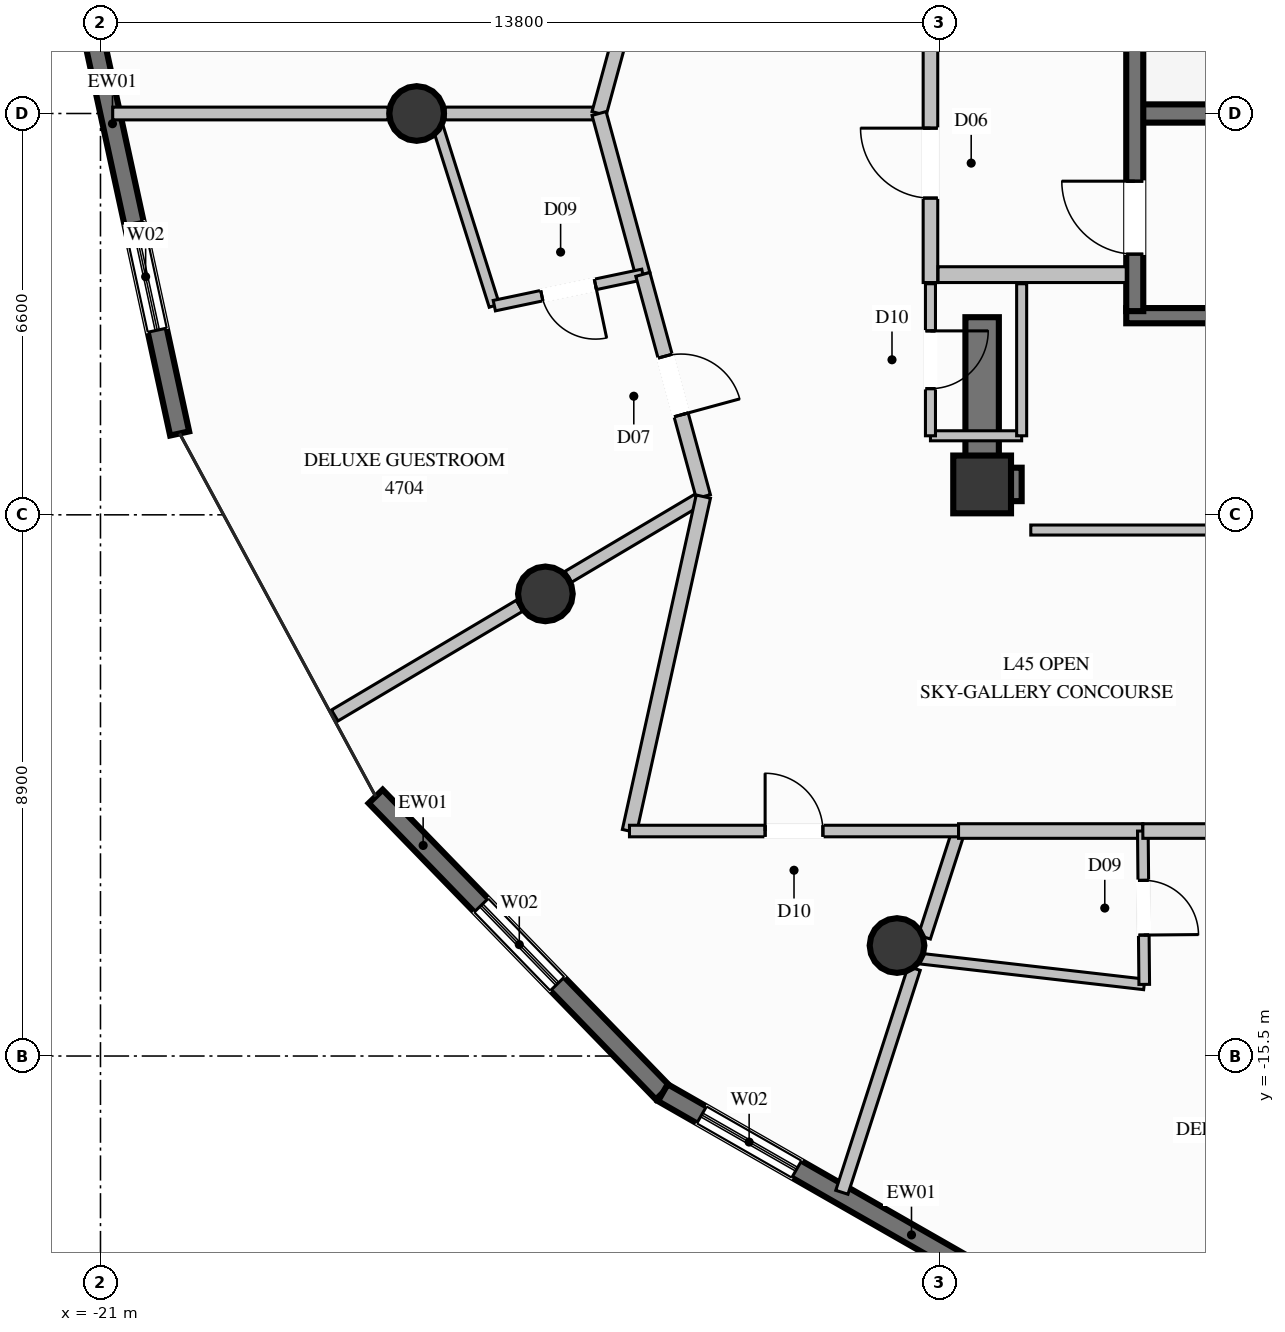
"""IFC4 building model, lengths in metres.
Left out: names, types, materials, properties, quantities, classifications, styles, units other than length and angle.
Written with IfcOpenShell. Run it as: python <this file> out.ifc"""

import sys

from ifc_helpers import new_model, si_unit, direction, frame, frame_2d, origin, origin_2d, place, context, subcontext, project, spatial, rectangle, circle, extrude, element, fill, save


model = new_model("IFC4")
c1 = context("Model", 3, precision=1e-05, world=origin(), true_north=direction((0.0, 1.0)))
c2 = subcontext(c1, "Body", "Model", "MODEL_VIEW")
j1 = project(units=[si_unit("LENGTHUNIT", "METRE"), si_unit("PLANEANGLEUNIT", "RADIAN")], contexts=[c1])
p1 = place(None, origin())
s1 = spatial("IfcSite", under=j1, at=p1, CompositionType="ELEMENT")
p2 = place(p1, origin())
s2 = spatial("IfcBuilding", under=s1, at=p2, CompositionType="ELEMENT")
p3 = place(p2, frame((0.0, 0.0, 176.8)))
s3 = spatial("IfcBuildingStorey", under=s2, at=p3, CompositionType="ELEMENT", Elevation=176.8)
p4 = place(p3, frame((-6.5, -6.1, 0.0), z_axis=(0.0, 0.0, 1.0), x_axis=(1.0, 0.0, 0.0)))
e1 = element("IfcColumn", 1, at=p4, inside=s3, PredefinedType="COLUMN", context=c2, shape_type="SweptSolid", body=[
    extrude(rectangle(XDim=0.95, YDim=0.95, at=origin_2d()), origin(), (0.0, 0.0, 1.0), 3.6),
])
p5 = place(p3, frame((-3.99, 0.0, 0.0), z_axis=(0.0, 0.0, 1.0), x_axis=(1.0, 0.0, 0.0)))
e2 = element("IfcWall", 2, at=p5, inside=s3, PredefinedType="SHEAR", context=c2, shape_type="SweptSolid", body=[
    extrude(rectangle(XDim=7.98, YDim=0.3, at=frame_2d((3.99, 0.0))), origin(), (0.0, 0.0, 1.0), 3.6),
])
p6 = place(p3, frame((-4.13, -3.325, 0.0), z_axis=(0.0, 0.0, 1.0), x_axis=(1.0, 0.0, 0.0)))
e3 = element("IfcWall", 3, at=p6, inside=s3, PredefinedType="SOLIDWALL", context=c2, shape_type="SweptSolid", body=[
    extrude(rectangle(XDim=8.26, YDim=0.25, at=frame_2d((4.13, 0.0))), origin(), (0.0, 0.0, 1.0), 3.6),
])
p7 = place(p3, frame((-6.225, -6.1, 0.0), z_axis=(0.0, 0.0, 1.0), x_axis=(1.0, 0.0, 0.0)))
e4 = element("IfcWall", 4, at=p7, inside=s3, PredefinedType="SHEAR", context=c2, shape_type="SweptSolid", body=[
    extrude(rectangle(XDim=0.375, YDim=0.55, at=frame_2d((0.188, 0.0))), origin(), (0.0, 0.0, 1.0), 3.6),
])
p8 = place(p3, frame((-6.5, -6.375, 0.0), z_axis=(0.0, 0.0, 1.0), x_axis=(0.0, 1.0, 0.0)))
e5 = element("IfcWall", 5, at=p8, inside=s3, PredefinedType="SHEAR", context=c2, shape_type="SweptSolid", body=[
    extrude(rectangle(XDim=3.025, YDim=0.55, at=frame_2d((1.512, 0.0))), origin(), (0.0, 0.0, 1.0), 3.6),
])
for number, where, z_axis, x_axis in (
    (6, (-15.8, 0.0, 0.0), (0.0, 0.0, 1.0), (1.0, 0.0, 0.0)),
    (7, (-13.683, -7.9, 0.0), (0.0, 0.0, 1.0), (1.0, 0.0, 0.0)),
    (8, (-7.9, -13.683, 0.0), (0.0, 0.0, 1.0), (1.0, 0.0, 0.0)),
):
    element("IfcColumn", number, at=place(p3, frame(where, z_axis=z_axis, x_axis=x_axis)), inside=s3, PredefinedType="COLUMN", context=c2, shape_type="SweptSolid", body=[
        extrude(circle(Radius=0.45, at=origin_2d()), origin(), (0.0, 0.0, 1.0), 3.6),
    ])
p9 = place(p3, frame((-19.698, -5.262, 0.0), z_axis=(0.0, 0.0, 1.0), x_axis=(-0.211992849193, 0.977271217161, 0.0)))
e9 = element("IfcWall", 9, at=p9, inside=s3, PredefinedType="SOLIDWALL", context=c2, shape_type="SweptSolid", body=[
    extrude(rectangle(XDim=6.637, YDim=0.32, at=frame_2d((3.318, 0.0))), origin(), (0.0, 0.0, 1.0), 3.36),
])
p10 = place(p9, frame((1.738, 0.0, 0.35)))
e10 = element("IfcOpeningElement", 10, at=p10, cuts=e9, PredefinedType="OPENING", context=c2, shape_type="SweptSolid", body=[
    extrude(rectangle(XDim=1.8, YDim=2.6, at=frame_2d((0.9, 1.3))), frame((0.0, 0.17, 0.0), z_axis=(0.0, -1.0, 0.0), x_axis=(1.0, 0.0, 0.0)), (0.0, 0.0, 1.0), 0.34),
])
p11 = place(p3, frame((-11.751, -16.103, 0.0), z_axis=(0.0, 0.0, 1.0), x_axis=(-0.696119985346, 0.71792545992, 0.0)))
e11 = element("IfcWall", 11, at=p11, inside=s3, PredefinedType="SOLIDWALL", context=c2, shape_type="SweptSolid", body=[
    extrude(rectangle(XDim=6.785, YDim=0.32, at=frame_2d((3.393, 0.0))), origin(), (0.0, 0.0, 1.0), 3.36),
])
p12 = place(p11, frame((2.492, 0.0, 0.35)))
e12 = element("IfcOpeningElement", 12, at=p12, cuts=e11, PredefinedType="OPENING", context=c2, shape_type="SweptSolid", body=[
    extrude(rectangle(XDim=1.8, YDim=2.6, at=frame_2d((0.9, 1.3))), frame((0.0, 0.17, 0.0), z_axis=(0.0, -1.0, 0.0), x_axis=(1.0, 0.0, 0.0)), (0.0, 0.0, 1.0), 0.34),
])
p13 = place(p3, frame((-5.99, -19.398, 0.0), z_axis=(0.0, 0.0, 1.0), x_axis=(-0.868052920032, 0.496471678974, 0.0)))
e13 = element("IfcWall", 13, at=p13, inside=s3, PredefinedType="SOLIDWALL", context=c2, shape_type="SweptSolid", body=[
    extrude(rectangle(XDim=6.637, YDim=0.32, at=frame_2d((3.318, 0.0))), origin(), (0.0, 0.0, 1.0), 3.36),
])
p14 = place(p13, frame((4.102, 0.0, 0.35)))
e14 = element("IfcOpeningElement", 14, at=p14, cuts=e13, PredefinedType="OPENING", context=c2, shape_type="SweptSolid", body=[
    extrude(rectangle(XDim=1.8, YDim=2.6, at=frame_2d((0.9, 1.3))), frame((0.0, 0.17, 0.0), z_axis=(0.0, -1.0, 0.0), x_axis=(1.0, 0.0, 0.0)), (0.0, 0.0, 1.0), 0.34),
])
p15 = place(p3, frame((-3.99, -3.25, 0.0), z_axis=(0.0, 0.0, 1.0), x_axis=(0.0, 1.0, 0.0)))
e15 = element("IfcWall", 15, at=p15, inside=s3, PredefinedType="SOLIDWALL", context=c2, shape_type="SweptSolid", body=[
    extrude(rectangle(XDim=5.46, YDim=0.28, at=frame_2d((2.73, 0.0))), origin(), (0.0, 0.0, 1.0), 3.36),
])
p16 = place(p15, frame((0.937, 0.0, 0.0)))
e16 = element("IfcOpeningElement", 16, at=p16, cuts=e15, PredefinedType="OPENING", context=c2, shape_type="SweptSolid", body=[
    extrude(rectangle(XDim=1.2, YDim=2.2, at=frame_2d((0.6, 1.1))), frame((0.0, 0.15, 0.0), z_axis=(0.0, -1.0, 0.0), x_axis=(1.0, 0.0, 0.0)), (0.0, 0.0, 1.0), 0.3),
])
p17 = place(p3, frame((-7.35, -2.78, 0.0), z_axis=(0.0, 0.0, 1.0), x_axis=(0.0, 1.0, 0.0)))
e17 = element("IfcWall", 17, at=p17, inside=s3, PredefinedType="PARTITIONING", context=c2, shape_type="SweptSolid", body=[
    extrude(rectangle(XDim=5.12, YDim=0.24, at=frame_2d((2.56, 0.0))), origin(), (0.0, 0.0, 1.0), 2.445),
])
p18 = place(p17, frame((1.389, 0.0, 0.0)))
e18 = element("IfcOpeningElement", 18, at=p18, cuts=e17, PredefinedType="OPENING", context=c2, shape_type="SweptSolid", body=[
    extrude(rectangle(XDim=1.15, YDim=2.2, at=frame_2d((0.575, 1.1))), frame((0.0, 0.13, 0.0), z_axis=(0.0, -1.0, 0.0), x_axis=(1.0, 0.0, 0.0)), (0.0, 0.0, 1.0), 0.26),
])
p19 = place(p3, frame((-7.225, -2.65, 0.0), z_axis=(0.0, 0.0, 1.0), x_axis=(1.0, 0.0, 0.0)))
e19 = element("IfcWall", 19, at=p19, inside=s3, PredefinedType="PARTITIONING", context=c2, shape_type="SweptSolid", body=[
    extrude(rectangle(XDim=3.095, YDim=0.26, at=frame_2d((1.548, 0.0))), origin(), (0.0, 0.0, 1.0), 3.36),
])
p20 = place(p3, frame((-7.35, -5.3, 0.0), z_axis=(0.0, 0.0, 1.0), x_axis=(1.0, 0.0, 0.0)))
e20 = element("IfcWall", 20, at=p20, inside=s3, PredefinedType="PARTITIONING", context=c2, shape_type="SweptSolid", body=[
    extrude(rectangle(XDim=1.5, YDim=0.165, at=frame_2d((0.75, 0.0))), origin(), (0.0, 0.0, 1.0), 2.445),
])
p21 = place(p3, frame((-5.85, -5.3, 0.0), z_axis=(0.0, 0.0, 1.0), x_axis=(0.0, 1.0, 0.0)))
e21 = element("IfcWall", 21, at=p21, inside=s3, PredefinedType="PARTITIONING", context=c2, shape_type="SweptSolid", body=[
    extrude(rectangle(XDim=2.5, YDim=0.165, at=frame_2d((1.25, 0.0))), origin(), (0.0, 0.0, 1.0), 2.445),
])
p22 = place(p3, frame((-7.35, -2.8, 0.0), z_axis=(0.0, 0.0, 1.0), x_axis=(0.0, -1.0, 0.0)))
e22 = element("IfcWall", 22, at=p22, inside=s3, PredefinedType="PARTITIONING", context=c2, shape_type="SweptSolid", body=[
    extrude(rectangle(XDim=2.5, YDim=0.165, at=frame_2d((1.25, 0.0))), origin(), (0.0, 0.0, 1.0), 3.36),
])
p23 = place(p22, frame((0.775, 0.0, 0.0)))
e23 = element("IfcOpeningElement", 23, at=p23, cuts=e22, PredefinedType="OPENING", context=c2, shape_type="SweptSolid", body=[
    extrude(rectangle(XDim=0.95, YDim=2.1, at=frame_2d((0.475, 1.05))), frame((0.0, 0.093, 0.0), z_axis=(0.0, -1.0, 0.0), x_axis=(1.0, 0.0, 0.0)), (0.0, 0.0, 1.0), 0.185),
])
p24 = place(p3, frame((-5.7, -6.85, 0.0), z_axis=(0.0, 0.0, 1.0), x_axis=(1.0, 0.0, 0.0)))
e24 = element("IfcWall", 24, at=p24, inside=s3, PredefinedType="PARTITIONING", context=c2, shape_type="SweptSolid", body=[
    extrude(rectangle(XDim=9.65, YDim=0.165, at=frame_2d((4.825, 0.0))), origin(), (0.0, 0.0, 1.0), 2.445),
])
p25 = place(p24, frame((4.35, 0.0, 0.0)))
e25 = element("IfcOpeningElement", 25, at=p25, cuts=e24, PredefinedType="OPENING", context=c2, shape_type="SweptSolid", body=[
    extrude(rectangle(XDim=0.95, YDim=2.1, at=frame_2d((0.475, 1.05))), frame((0.0, 0.093, 0.0), z_axis=(0.0, -1.0, 0.0), x_axis=(1.0, 0.0, 0.0)), (0.0, 0.0, 1.0), 0.185),
])
p26 = place(p3, frame((-12.8, 0.0, 0.0), z_axis=(0.0, 0.0, 1.0), x_axis=(-1.0, 0.0, 0.0)))
e26 = element("IfcWall", 26, at=p26, inside=s3, PredefinedType="PARTITIONING", context=c2, shape_type="SweptSolid", body=[
    extrude(rectangle(XDim=2.53, YDim=0.21, at=frame_2d((1.265, 0.0))), origin(), (0.0, 0.0, 1.0), 3.36),
])
p27 = place(p3, frame((-16.27, 0.0, 0.0), z_axis=(0.0, 0.0, 1.0), x_axis=(-1.0, 0.0, 0.0)))
e27 = element("IfcWall", 27, at=p27, inside=s3, PredefinedType="PARTITIONING", context=c2, shape_type="SweptSolid", body=[
    extrude(rectangle(XDim=4.529, YDim=0.21, at=frame_2d((2.265, 0.0))), origin(), (0.0, 0.0, 1.0), 3.36),
])
p28 = place(p3, frame((-11.085, -6.3, 0.0), z_axis=(0.0, 0.0, 1.0), x_axis=(-0.859827513331, -0.510584613281, 0.0)))
e28 = element("IfcWall", 28, at=p28, inside=s3, PredefinedType="PARTITIONING", context=c2, shape_type="SweptSolid", body=[
    extrude(rectangle(XDim=2.583, YDim=0.21, at=frame_2d((1.292, 0.0))), origin(), (0.0, 0.0, 1.0), 2.876),
])
p29 = place(p3, frame((-14.11, -8.096, 0.0), z_axis=(0.0, 0.0, 1.0), x_axis=(-0.859825355727, -0.510588246682, 0.0)))
e29 = element("IfcWall", 29, at=p29, inside=s3, PredefinedType="PARTITIONING", context=c2, shape_type="SweptSolid", body=[
    extrude(rectangle(XDim=3.533, YDim=0.21, at=frame_2d((1.767, 0.0))), origin(), (0.0, 0.0, 1.0), 3.36),
])
p30 = place(p3, frame((-11.805, 3.654, 0.0), z_axis=(0.0, 0.0, 1.0), x_axis=(-0.262762825819, -0.964860454868, 0.0)))
e30 = element("IfcWall", 30, at=p30, inside=s3, PredefinedType="PARTITIONING", context=c2, shape_type="SweptSolid", body=[
    extrude(rectangle(XDim=3.787, YDim=0.24, at=frame_2d((1.894, 0.0))), origin(), (0.0, 0.0, 1.0), 3.36),
])
p31 = place(p30, frame((1.394, 0.0, 0.0)))
e31 = element("IfcOpeningElement", 31, at=p31, cuts=e30, PredefinedType="OPENING", context=c2, shape_type="SweptSolid", body=[
    extrude(rectangle(XDim=1.0, YDim=2.2, at=frame_2d((0.5, 1.1))), frame((0.0, 0.13, 0.0), z_axis=(0.0, -1.0, 0.0), x_axis=(1.0, 0.0, 0.0)), (0.0, 0.0, 1.0), 0.26),
])
p32 = place(p3, frame((-12.8, 0.0, 0.0), z_axis=(0.0, 0.0, 1.0), x_axis=(0.262552356383, -0.964917747872, 0.0)))
e32 = element("IfcWall", 32, at=p32, inside=s3, PredefinedType="PARTITIONING", context=c2, shape_type="SweptSolid", body=[
    extrude(rectangle(XDim=2.742, YDim=0.24, at=frame_2d((1.371, 0.0))), origin(), (0.0, 0.0, 1.0), 3.36),
])
p33 = place(p3, frame((-15.52, 0.0, 0.0), z_axis=(0.0, 0.0, 1.0), x_axis=(0.300912730095, -0.953651681101, 0.0)))
e33 = element("IfcWall", 33, at=p33, inside=s3, PredefinedType="PLUMBINGWALL", context=c2, shape_type="SweptSolid", body=[
    extrude(rectangle(XDim=3.313, YDim=0.175, at=frame_2d((1.657, 0.0))), origin(), (0.0, 0.0, 1.0), 2.929),
])
p34 = place(p3, frame((-12.08, -2.646, 0.0), z_axis=(0.0, 0.0, 1.0), x_axis=(-0.978579866642, -0.205867541403, 0.0)))
e34 = element("IfcWall", 34, at=p34, inside=s3, PredefinedType="PLUMBINGWALL", context=c2, shape_type="SweptSolid", body=[
    extrude(rectangle(XDim=2.496, YDim=0.175, at=frame_2d((1.248, 0.0))), origin(), (0.0, 0.0, 1.0), 3.36),
])
p35 = place(p34, frame((0.798, 0.0, 0.0)))
e35 = element("IfcOpeningElement", 35, at=p35, cuts=e34, PredefinedType="OPENING", context=c2, shape_type="SweptSolid", body=[
    extrude(rectangle(XDim=0.9, YDim=2.1, at=frame_2d((0.45, 1.05))), frame((0.0, 0.098, 0.0), z_axis=(0.0, -1.0, 0.0), x_axis=(1.0, 0.0, 0.0)), (0.0, 0.0, 1.0), 0.195),
])
p36 = place(p3, frame((-12.08, -2.646, 0.0), z_axis=(0.0, 0.0, 1.0), x_axis=(0.262762825819, -0.964860454868, 0.0)))
e36 = element("IfcWall", 36, at=p36, inside=s3, PredefinedType="PARTITIONING", context=c2, shape_type="SweptSolid", body=[
    extrude(rectangle(XDim=3.787, YDim=0.24, at=frame_2d((1.894, 0.0))), origin(), (0.0, 0.0, 1.0), 3.36),
])
p37 = place(p36, frame((1.394, 0.0, 0.0)))
e37 = element("IfcOpeningElement", 37, at=p37, cuts=e36, PredefinedType="OPENING", context=c2, shape_type="SweptSolid", body=[
    extrude(rectangle(XDim=1.0, YDim=2.2, at=frame_2d((0.5, 1.1))), frame((0.0, 0.13, 0.0), z_axis=(0.0, -1.0, 0.0), x_axis=(1.0, 0.0, 0.0)), (0.0, 0.0, 1.0), 0.26),
])
p38 = place(p3, frame((-6.888, -11.8, 0.0), z_axis=(0.0, 0.0, 1.0), x_axis=(-0.307220756357, -0.95163827522, 0.0)))
e38 = element("IfcWall", 38, at=p38, inside=s3, PredefinedType="PARTITIONING", context=c2, shape_type="SweptSolid", body=[
    extrude(rectangle(XDim=1.833, YDim=0.21, at=frame_2d((0.916, 0.0))), origin(), (0.0, 0.0, 1.0), 2.876),
])
p39 = place(p3, frame((-7.618, -14.059, 0.0), z_axis=(0.0, 0.0, 1.0), x_axis=(-0.307297747986, -0.9516134163, 0.0)))
e39 = element("IfcWall", 39, at=p39, inside=s3, PredefinedType="PARTITIONING", context=c2, shape_type="SweptSolid", body=[
    extrude(rectangle(XDim=3.869, YDim=0.21, at=frame_2d((1.935, 0.0))), origin(), (0.0, 0.0, 1.0), 3.36),
])
p40 = place(p3, frame((-11.085, -6.3, 0.0), z_axis=(0.0, 0.0, 1.0), x_axis=(-0.21572328796, -0.976454537104, 0.0)))
e40 = element("IfcWall", 40, at=p40, inside=s3, PredefinedType="PARTITIONING", context=c2, shape_type="SweptSolid", body=[
    extrude(rectangle(XDim=5.633, YDim=0.24, at=frame_2d((2.816, 0.0))), origin(), (0.0, 0.0, 1.0), 3.36),
])
p41 = place(p3, frame((-12.3, -11.8, 0.0), z_axis=(0.0, 0.0, 1.0), x_axis=(1.0, 0.0, 0.0)))
e41 = element("IfcWall", 41, at=p41, inside=s3, PredefinedType="PARTITIONING", context=c2, shape_type="SweptSolid", body=[
    extrude(rectangle(XDim=5.412, YDim=0.19, at=frame_2d((2.706, 0.0))), origin(), (0.0, 0.0, 1.0), 3.36),
])
p42 = place(p41, frame((2.231, 0.0, 0.0)))
e42 = element("IfcOpeningElement", 42, at=p42, cuts=e41, PredefinedType="OPENING", context=c2, shape_type="SweptSolid", body=[
    extrude(rectangle(XDim=0.95, YDim=2.1, at=frame_2d((0.475, 1.05))), frame((0.0, 0.105, 0.0), z_axis=(0.0, -1.0, 0.0), x_axis=(1.0, 0.0, 0.0)), (0.0, 0.0, 1.0), 0.21),
])
p43 = place(p3, frame((-6.888, -11.8, 0.0), z_axis=(0.0, 0.0, 1.0), x_axis=(1.0, 0.0, 0.0)))
e43 = element("IfcWall", 43, at=p43, inside=s3, PredefinedType="PARTITIONING", context=c2, shape_type="SweptSolid", body=[
    extrude(rectangle(XDim=3.031, YDim=0.24, at=frame_2d((1.516, 0.0))), origin(), (0.0, 0.0, 1.0), 3.36),
])
p44 = place(p3, frame((-7.564, -13.893, 0.0), z_axis=(0.0, 0.0, 1.0), x_axis=(0.993452151759, -0.114248948203, 0.0)))
e44 = element("IfcWall", 44, at=p44, inside=s3, PredefinedType="PLUMBINGWALL", context=c2, shape_type="SweptSolid", body=[
    extrude(rectangle(XDim=3.755, YDim=0.175, at=frame_2d((1.877, 0.0))), origin(), (0.0, 0.0, 1.0), 2.929),
])
p45 = place(p3, frame((-3.857, -11.8, 0.0), z_axis=(0.0, 0.0, 1.0), x_axis=(0.009099332858, -0.999958600214, 0.0)))
e45 = element("IfcWall", 45, at=p45, inside=s3, PredefinedType="PLUMBINGWALL", context=c2, shape_type="SweptSolid", body=[
    extrude(rectangle(XDim=2.522, YDim=0.175, at=frame_2d((1.261, 0.0))), origin(), (0.0, 0.0, 1.0), 3.36),
])
p46 = place(p45, frame((0.811, 0.0, 0.0)))
e46 = element("IfcOpeningElement", 46, at=p46, cuts=e45, PredefinedType="OPENING", context=c2, shape_type="SweptSolid", body=[
    extrude(rectangle(XDim=0.9, YDim=2.1, at=frame_2d((0.45, 1.05))), frame((0.0, 0.098, 0.0), z_axis=(0.0, -1.0, 0.0), x_axis=(1.0, 0.0, 0.0)), (0.0, 0.0, 1.0), 0.195),
])
p47 = place(p3, frame((-3.857, -11.8, 0.0), z_axis=(0.0, 0.0, 1.0), x_axis=(1.0, 0.0, 0.0)))
e47 = element("IfcWall", 47, at=p47, inside=s3, PredefinedType="PARTITIONING", context=c2, shape_type="SweptSolid", body=[
    extrude(rectangle(XDim=3.857, YDim=0.24, at=frame_2d((1.928, 0.0))), origin(), (0.0, 0.0, 1.0), 3.36),
])
p48 = place(p47, frame((1.429, 0.0, 0.0)))
e48 = element("IfcOpeningElement", 48, at=p48, cuts=e47, PredefinedType="OPENING", context=c2, shape_type="SweptSolid", body=[
    extrude(rectangle(XDim=1.0, YDim=2.2, at=frame_2d((0.5, 1.1))), frame((0.0, 0.13, 0.0), z_axis=(0.0, -1.0, 0.0), x_axis=(1.0, 0.0, 0.0)), (0.0, 0.0, 1.0), 0.26),
])
p49 = place(p10, origin())
e49 = element("IfcWindow", 49, at=p49, inside=s3, PartitioningType="SINGLE_PANEL", PredefinedType="WINDOW", context=c2, shape_type="SweptSolid", body=[
    extrude(rectangle(XDim=1.8, YDim=2.6, at=frame_2d((0.9, 1.3))), frame((0.0, 0.03, 0.0), z_axis=(0.0, -1.0, 0.0), x_axis=(1.0, 0.0, 0.0)), (0.0, 0.0, 1.0), 0.06),
])
fill(e10, e49)
p50 = place(p12, origin())
e50 = element("IfcWindow", 50, at=p50, inside=s3, PartitioningType="SINGLE_PANEL", PredefinedType="WINDOW", context=c2, shape_type="SweptSolid", body=[
    extrude(rectangle(XDim=1.8, YDim=2.6, at=frame_2d((0.9, 1.3))), frame((0.0, 0.03, 0.0), z_axis=(0.0, -1.0, 0.0), x_axis=(1.0, 0.0, 0.0)), (0.0, 0.0, 1.0), 0.06),
])
fill(e12, e50)
p51 = place(p14, origin())
e51 = element("IfcWindow", 51, at=p51, inside=s3, PartitioningType="SINGLE_PANEL", PredefinedType="WINDOW", context=c2, shape_type="SweptSolid", body=[
    extrude(rectangle(XDim=1.8, YDim=2.6, at=frame_2d((0.9, 1.3))), frame((0.0, 0.03, 0.0), z_axis=(0.0, -1.0, 0.0), x_axis=(1.0, 0.0, 0.0)), (0.0, 0.0, 1.0), 0.06),
])
fill(e14, e51)
p52 = place(p16, origin())
e52 = element("IfcDoor", 52, at=p52, inside=s3, OperationType="SINGLE_SWING_RIGHT", PredefinedType="DOOR", context=c2, shape_type="SweptSolid", body=[
    extrude(rectangle(XDim=1.2, YDim=2.2, at=frame_2d((0.6, 1.1))), frame((0.0, 0.025, 0.0), z_axis=(0.0, -1.0, 0.0), x_axis=(1.0, 0.0, 0.0)), (0.0, 0.0, 1.0), 0.05),
])
fill(e16, e52)
p53 = place(p18, origin())
e53 = element("IfcDoor", 53, at=p53, inside=s3, OperationType="SINGLE_SWING_RIGHT", PredefinedType="DOOR", context=c2, shape_type="SweptSolid", body=[
    extrude(rectangle(XDim=1.15, YDim=2.2, at=frame_2d((0.575, 1.1))), frame((0.0, 0.025, 0.0), z_axis=(0.0, -1.0, 0.0), x_axis=(1.0, 0.0, 0.0)), (0.0, 0.0, 1.0), 0.05),
])
fill(e18, e53)
p54 = place(p23, origin())
e54 = element("IfcDoor", 54, at=p54, inside=s3, OperationType="SINGLE_SWING_LEFT", PredefinedType="DOOR", context=c2, shape_type="SweptSolid", body=[
    extrude(rectangle(XDim=0.95, YDim=2.1, at=frame_2d((0.475, 1.05))), frame((0.0, 0.025, 0.0), z_axis=(0.0, -1.0, 0.0), x_axis=(1.0, 0.0, 0.0)), (0.0, 0.0, 1.0), 0.05),
])
fill(e23, e54)
p55 = place(p35, origin())
e55 = element("IfcDoor", 55, at=p55, inside=s3, OperationType="SINGLE_SWING_LEFT", PredefinedType="DOOR", context=c2, shape_type="SweptSolid", body=[
    extrude(rectangle(XDim=0.9, YDim=2.1, at=frame_2d((0.45, 1.05))), frame((0.0, 0.025, 0.0), z_axis=(0.0, -1.0, 0.0), x_axis=(1.0, 0.0, 0.0)), (0.0, 0.0, 1.0), 0.05),
])
fill(e35, e55)
p56 = place(p37, origin())
e56 = element("IfcDoor", 56, at=p56, inside=s3, OperationType="SINGLE_SWING_RIGHT", PredefinedType="DOOR", context=c2, shape_type="SweptSolid", body=[
    extrude(rectangle(XDim=1.0, YDim=2.2, at=frame_2d((0.5, 1.1))), frame((0.0, 0.025, 0.0), z_axis=(0.0, -1.0, 0.0), x_axis=(1.0, 0.0, 0.0)), (0.0, 0.0, 1.0), 0.05),
])
fill(e37, e56)
p57 = place(p42, origin())
e57 = element("IfcDoor", 57, at=p57, inside=s3, OperationType="SINGLE_SWING_LEFT", PredefinedType="DOOR", context=c2, shape_type="SweptSolid", body=[
    extrude(rectangle(XDim=0.95, YDim=2.1, at=frame_2d((0.475, 1.05))), frame((0.0, 0.025, 0.0), z_axis=(0.0, -1.0, 0.0), x_axis=(1.0, 0.0, 0.0)), (0.0, 0.0, 1.0), 0.05),
])
fill(e42, e57)
p58 = place(p46, origin())
e58 = element("IfcDoor", 58, at=p58, inside=s3, OperationType="SINGLE_SWING_RIGHT", PredefinedType="DOOR", context=c2, shape_type="SweptSolid", body=[
    extrude(rectangle(XDim=0.9, YDim=2.1, at=frame_2d((0.45, 1.05))), frame((0.0, 0.025, 0.0), z_axis=(0.0, -1.0, 0.0), x_axis=(1.0, 0.0, 0.0)), (0.0, 0.0, 1.0), 0.05),
])
fill(e46, e58)
save(model, sys.argv[1])
